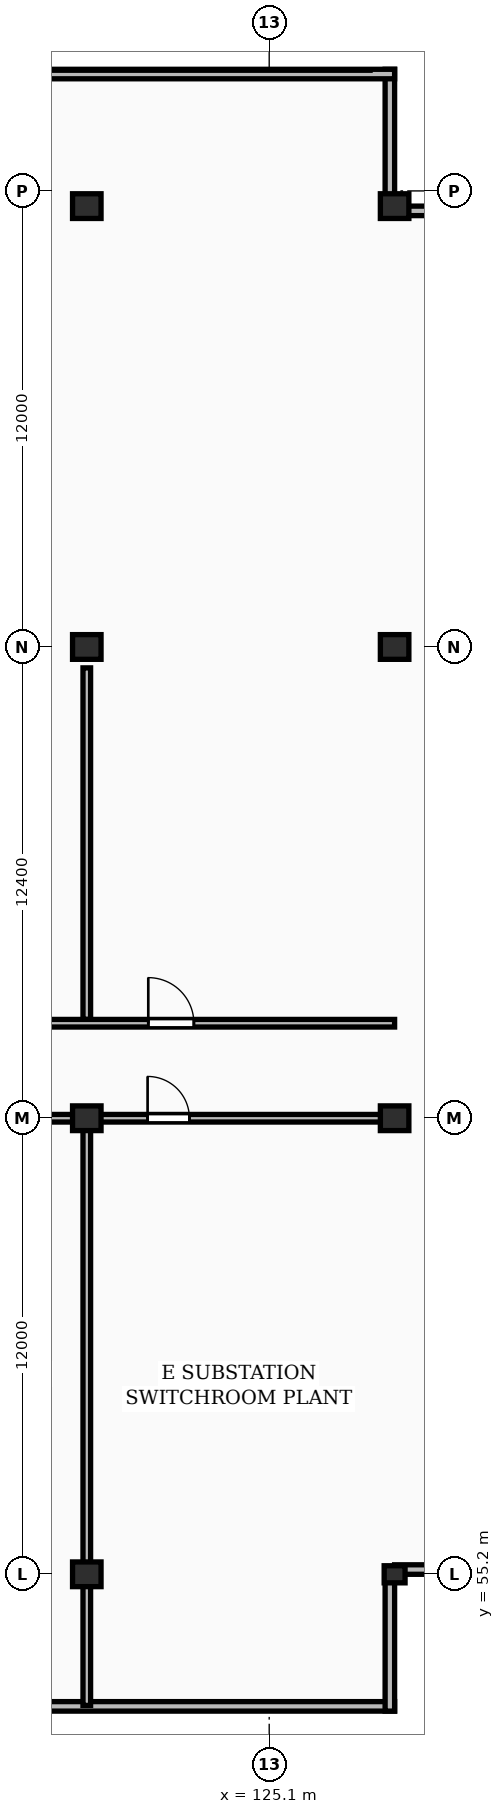
"""IFC4 building model, lengths in metres.
Left out: names, types, materials, properties, quantities, classifications, styles, units other than length and angle.
Written with IfcOpenShell. Run it as: python <this file> out.ifc"""

import sys

from ifc_helpers import new_model, si_unit, direction, frame, frame_2d, origin, origin_2d, place, context, subcontext, project, spatial, rectangle, extrude, element, fill, save


model = new_model("IFC4")
c1 = context("Model", 3, precision=1e-05, world=origin(), true_north=direction((0.0, 1.0)))
c2 = subcontext(c1, "Body", "Model", "MODEL_VIEW")
j1 = project(units=[si_unit("LENGTHUNIT", "METRE"), si_unit("PLANEANGLEUNIT", "RADIAN")], contexts=[c1])
p1 = place(None, origin())
s1 = spatial("IfcSite", under=j1, at=p1, CompositionType="ELEMENT")
p2 = place(p1, origin())
s2 = spatial("IfcBuilding", under=s1, at=p2, CompositionType="ELEMENT")
p3 = place(p2, frame((0.0, 0.0, 259.7)))
s3 = spatial("IfcBuildingStorey", under=s2, at=p3, CompositionType="ELEMENT", Elevation=259.7)
for number, where, z_axis, x_axis in (
    (1, (120.3, 55.2, 0.0), (0.0, 0.0, 1.0), (1.0, 0.0, 0.0)),
    (2, (120.3, 67.2, 0.0), (0.0, 0.0, 1.0), (1.0, 0.0, 0.0)),
    (3, (120.3, 79.6, 0.0), (0.0, 0.0, 1.0), (1.0, 0.0, 0.0)),
    (4, (120.3, 91.2, 0.0), (0.0, 0.0, 1.0), (1.0, 0.0, 0.0)),
):
    element("IfcColumn", number, at=place(p3, frame(where, z_axis=z_axis, x_axis=x_axis)), inside=s3, PredefinedType="COLUMN", context=c2, shape_type="SweptSolid", body=[
        extrude(rectangle(XDim=0.75, YDim=0.65, at=origin_2d()), origin(), (0.0, 0.0, 1.0), 4.5),
    ])
p4 = place(p3, frame((128.4, 55.2, 0.0), z_axis=(0.0, 0.0, 1.0), x_axis=(1.0, 0.0, 0.0)))
e5 = element("IfcColumn", 5, at=p4, inside=s3, PredefinedType="PILASTER", context=c2, shape_type="SweptSolid", body=[
    extrude(rectangle(XDim=0.55, YDim=0.45, at=origin_2d()), origin(), (0.0, 0.0, 1.0), 4.5),
])
for number, where, z_axis, x_axis in (
    (6, (128.4, 67.2, 0.0), (0.0, 0.0, 1.0), (1.0, 0.0, 0.0)),
    (7, (128.4, 79.6, 0.0), (0.0, 0.0, 1.0), (1.0, 0.0, 0.0)),
    (8, (128.4, 91.2, 0.0), (0.0, 0.0, 1.0), (1.0, 0.0, 0.0)),
):
    element("IfcColumn", number, at=place(p3, frame(where, z_axis=z_axis, x_axis=x_axis)), inside=s3, PredefinedType="COLUMN", context=c2, shape_type="SweptSolid", body=[
        extrude(rectangle(XDim=0.75, YDim=0.65, at=origin_2d()), origin(), (0.0, 0.0, 1.0), 4.5),
    ])
p5 = place(p3, frame((59.8, 51.725, 0.0), z_axis=(0.0, 0.0, 1.0), x_axis=(1.0, 0.0, 0.0)))
e9 = element("IfcWall", 9, at=p5, inside=s3, PredefinedType="SHEAR", context=c2, shape_type="SweptSolid", body=[
    extrude(rectangle(XDim=68.6, YDim=0.25, at=frame_2d((34.3, 0.0))), origin(), (0.0, 0.0, 1.0), 4.23),
])
p6 = place(p3, frame((128.275, 51.6, 0.0), z_axis=(0.0, 0.0, 1.0), x_axis=(0.0, 1.0, 0.0)))
e10 = element("IfcWall", 10, at=p6, inside=s3, PredefinedType="SHEAR", context=c2, shape_type="SweptSolid", body=[
    extrude(rectangle(XDim=3.6, YDim=0.25, at=frame_2d((1.8, 0.0))), origin(), (0.0, 0.0, 1.0), 4.23),
])
for number, where, z_axis, x_axis in (
    (11, (128.4, 55.325, 0.0), (0.0, 0.0, 1.0), (1.0, 0.0, 0.0)),
    (12, (132.0, 91.075, 0.0), (0.0, 0.0, 1.0), (-1.0, 0.0, 0.0)),
    (13, (128.275, 91.2, 0.0), (0.0, 0.0, 1.0), (0.0, 1.0, 0.0)),
):
    element("IfcWall", number, at=place(p3, frame(where, z_axis=z_axis, x_axis=x_axis)), inside=s3, PredefinedType="SHEAR", context=c2, shape_type="SweptSolid", body=[
        extrude(rectangle(XDim=3.6, YDim=0.25, at=frame_2d((1.8, 0.0))), origin(), (0.0, 0.0, 1.0), 4.23),
    ])
p7 = place(p3, frame((128.4, 94.675, 0.0), z_axis=(0.0, 0.0, 1.0), x_axis=(-1.0, 0.0, 0.0)))
e14 = element("IfcWall", 14, at=p7, inside=s3, PredefinedType="SHEAR", context=c2, shape_type="SweptSolid", body=[
    extrude(rectangle(XDim=68.6, YDim=0.25, at=frame_2d((34.3, 0.0))), origin(), (0.0, 0.0, 1.0), 4.23),
])
p8 = place(p3, frame((120.3, 69.8, 0.0), z_axis=(0.0, 0.0, 1.0), x_axis=(0.0, 1.0, 0.0)))
e15 = element("IfcWall", 15, at=p8, inside=s3, PredefinedType="PARTITIONING", context=c2, shape_type="SweptSolid", body=[
    extrude(rectangle(XDim=9.25, YDim=0.2, at=frame_2d((4.625, 0.0))), origin(), (0.0, 0.0, 1.0), 3.537),
])
p9 = place(p3, frame((59.8, 69.7, 0.0), z_axis=(0.0, 0.0, 1.0), x_axis=(1.0, 0.0, 0.0)))
e16 = element("IfcWall", 16, at=p9, inside=s3, PredefinedType="PARTITIONING", context=c2, shape_type="SweptSolid", body=[
    extrude(rectangle(XDim=68.6, YDim=0.2, at=frame_2d((34.3, 0.0))), origin(), (0.0, 0.0, 1.0), 4.23),
])
p10 = place(p9, frame((5.372, 0.0, 0.0)))
e17 = element("IfcOpeningElement", 17, at=p10, cuts=e16, PredefinedType="OPENING", context=c2, shape_type="SweptSolid", body=[
    extrude(rectangle(XDim=1.2, YDim=2.15, at=frame_2d((0.6, 1.075))), frame((0.0, 0.11, 0.0), z_axis=(0.0, -1.0, 0.0), x_axis=(1.0, 0.0, 0.0)), (0.0, 0.0, 1.0), 0.22),
])
p11 = place(p9, frame((13.514, 0.0, 0.0)))
e18 = element("IfcOpeningElement", 18, at=p11, cuts=e16, PredefinedType="OPENING", context=c2, shape_type="SweptSolid", body=[
    extrude(rectangle(XDim=1.2, YDim=2.15, at=frame_2d((0.6, 1.075))), frame((0.0, 0.11, 0.0), z_axis=(0.0, -1.0, 0.0), x_axis=(1.0, 0.0, 0.0)), (0.0, 0.0, 1.0), 0.22),
])
p12 = place(p9, frame((21.884, 0.0, 0.0)))
e19 = element("IfcOpeningElement", 19, at=p12, cuts=e16, PredefinedType="OPENING", context=c2, shape_type="SweptSolid", body=[
    extrude(rectangle(XDim=1.2, YDim=2.15, at=frame_2d((0.6, 1.075))), frame((0.0, 0.11, 0.0), z_axis=(0.0, -1.0, 0.0), x_axis=(1.0, 0.0, 0.0)), (0.0, 0.0, 1.0), 0.22),
])
p13 = place(p9, frame((31.119, 0.0, 0.0)))
e20 = element("IfcOpeningElement", 20, at=p13, cuts=e16, PredefinedType="OPENING", context=c2, shape_type="SweptSolid", body=[
    extrude(rectangle(XDim=1.2, YDim=2.15, at=frame_2d((0.6, 1.075))), frame((0.0, 0.11, 0.0), z_axis=(0.0, -1.0, 0.0), x_axis=(1.0, 0.0, 0.0)), (0.0, 0.0, 1.0), 0.22),
])
p14 = place(p9, frame((35.481, 0.0, 0.0)))
e21 = element("IfcOpeningElement", 21, at=p14, cuts=e16, PredefinedType="OPENING", context=c2, shape_type="SweptSolid", body=[
    extrude(rectangle(XDim=1.2, YDim=2.15, at=frame_2d((0.6, 1.075))), frame((0.0, 0.11, 0.0), z_axis=(0.0, -1.0, 0.0), x_axis=(1.0, 0.0, 0.0)), (0.0, 0.0, 1.0), 0.22),
])
p15 = place(p9, frame((44.681, 0.0, 0.0)))
e22 = element("IfcOpeningElement", 22, at=p15, cuts=e16, PredefinedType="OPENING", context=c2, shape_type="SweptSolid", body=[
    extrude(rectangle(XDim=1.2, YDim=2.15, at=frame_2d((0.6, 1.075))), frame((0.0, 0.11, 0.0), z_axis=(0.0, -1.0, 0.0), x_axis=(1.0, 0.0, 0.0)), (0.0, 0.0, 1.0), 0.22),
])
p16 = place(p9, frame((53.896, 0.0, 0.0)))
e23 = element("IfcOpeningElement", 23, at=p16, cuts=e16, PredefinedType="OPENING", context=c2, shape_type="SweptSolid", body=[
    extrude(rectangle(XDim=1.2, YDim=2.15, at=frame_2d((0.6, 1.075))), frame((0.0, 0.11, 0.0), z_axis=(0.0, -1.0, 0.0), x_axis=(1.0, 0.0, 0.0)), (0.0, 0.0, 1.0), 0.22),
])
p17 = place(p9, frame((62.118, 0.0, 0.0)))
e24 = element("IfcOpeningElement", 24, at=p17, cuts=e16, PredefinedType="OPENING", context=c2, shape_type="SweptSolid", body=[
    extrude(rectangle(XDim=1.2, YDim=2.15, at=frame_2d((0.6, 1.075))), frame((0.0, 0.11, 0.0), z_axis=(0.0, -1.0, 0.0), x_axis=(1.0, 0.0, 0.0)), (0.0, 0.0, 1.0), 0.22),
])
p18 = place(p3, frame((120.3, 51.75, 0.0), z_axis=(0.0, 0.0, 1.0), x_axis=(0.0, 1.0, 0.0)))
e25 = element("IfcWall", 25, at=p18, inside=s3, PredefinedType="PARTITIONING", context=c2, shape_type="SweptSolid", body=[
    extrude(rectangle(XDim=15.4, YDim=0.2, at=frame_2d((7.7, 0.0))), origin(), (0.0, 0.0, 1.0), 3.537),
])
p19 = place(p3, frame((112.25, 67.2, 0.0), z_axis=(0.0, 0.0, 1.0), x_axis=(1.0, 0.0, 0.0)))
e26 = element("IfcWall", 26, at=p19, inside=s3, PredefinedType="PARTITIONING", context=c2, shape_type="SweptSolid", body=[
    extrude(rectangle(XDim=16.1, YDim=0.2, at=frame_2d((8.05, 0.0))), origin(), (0.0, 0.0, 1.0), 3.61),
])
p20 = place(p19, frame((5.36, 0.0, 0.0)))
e27 = element("IfcOpeningElement", 27, at=p20, cuts=e26, PredefinedType="OPENING", context=c2, shape_type="SweptSolid", body=[
    extrude(rectangle(XDim=1.1, YDim=2.1, at=frame_2d((0.55, 1.05))), frame((0.0, 0.11, 0.0), z_axis=(0.0, -1.0, 0.0), x_axis=(1.0, 0.0, 0.0)), (0.0, 0.0, 1.0), 0.22),
])
p21 = place(p19, frame((9.65, 0.0, 0.0)))
e28 = element("IfcOpeningElement", 28, at=p21, cuts=e26, PredefinedType="OPENING", context=c2, shape_type="SweptSolid", body=[
    extrude(rectangle(XDim=1.1, YDim=2.1, at=frame_2d((0.55, 1.05))), frame((0.0, 0.11, 0.0), z_axis=(0.0, -1.0, 0.0), x_axis=(1.0, 0.0, 0.0)), (0.0, 0.0, 1.0), 0.22),
])
p22 = place(p17, origin())
e29 = element("IfcDoor", 29, at=p22, inside=s3, OperationType="SINGLE_SWING_LEFT", PredefinedType="DOOR", context=c2, shape_type="SweptSolid", body=[
    extrude(rectangle(XDim=1.2, YDim=2.15, at=frame_2d((0.6, 1.075))), frame((0.0, 0.025, 0.0), z_axis=(0.0, -1.0, 0.0), x_axis=(1.0, 0.0, 0.0)), (0.0, 0.0, 1.0), 0.05),
])
fill(e24, e29)
p23 = place(p21, origin())
e30 = element("IfcDoor", 30, at=p23, inside=s3, OperationType="SINGLE_SWING_LEFT", PredefinedType="DOOR", context=c2, shape_type="SweptSolid", body=[
    extrude(rectangle(XDim=1.1, YDim=2.1, at=frame_2d((0.55, 1.05))), frame((0.0, 0.025, 0.0), z_axis=(0.0, -1.0, 0.0), x_axis=(1.0, 0.0, 0.0)), (0.0, 0.0, 1.0), 0.05),
])
fill(e28, e30)
save(model, sys.argv[1])
